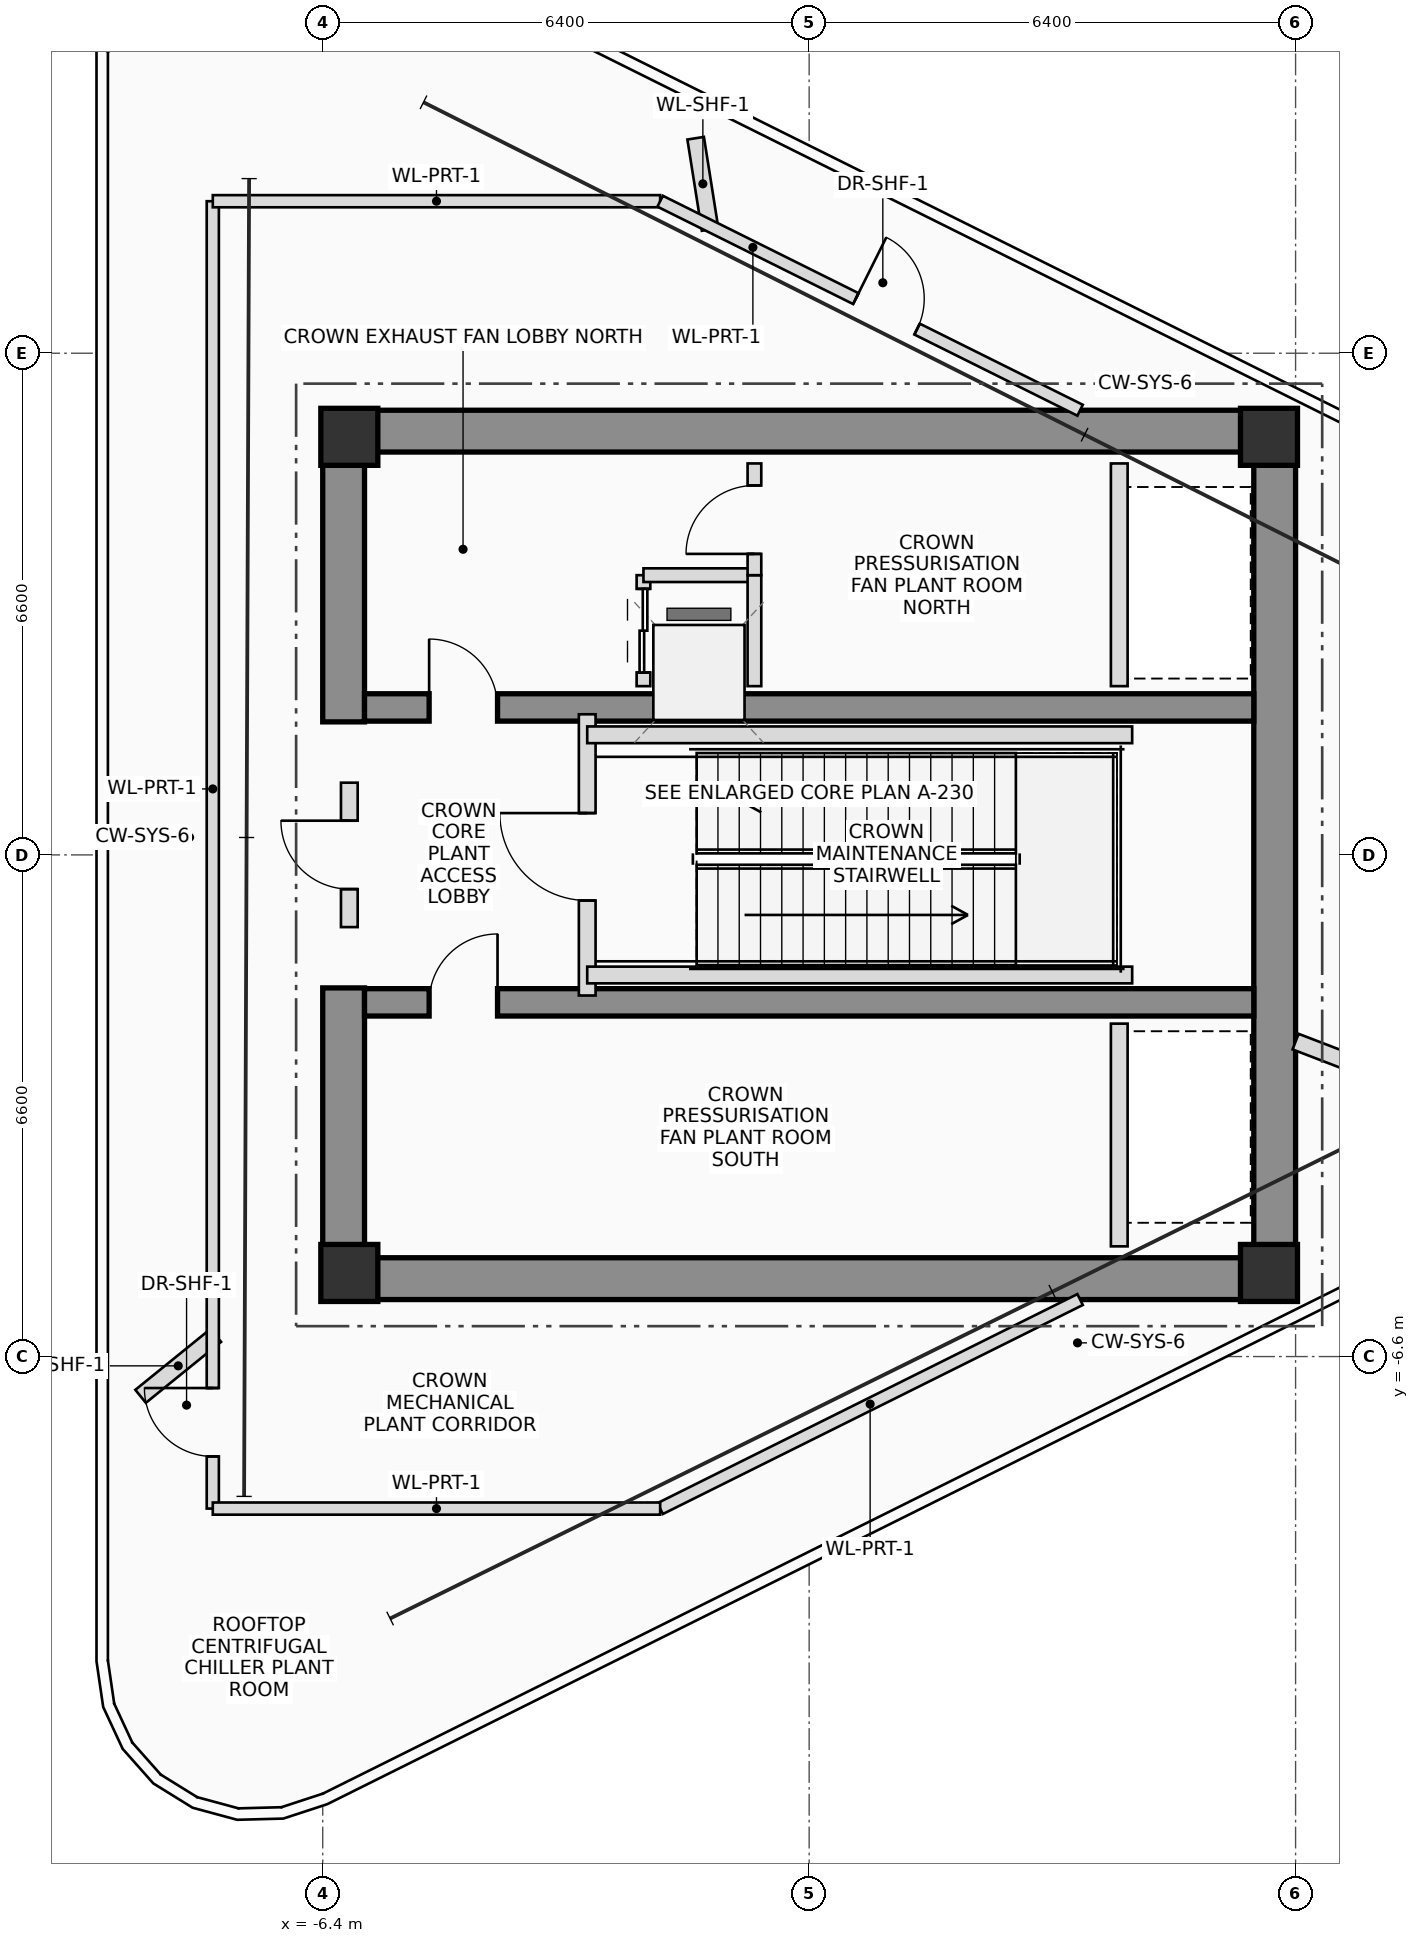
"""IFC4 building model, lengths in metres.
Left out: names, types, materials, properties, quantities, classifications, styles, units other than length and angle.
Written with IfcOpenShell. Run it as: python <this file> out.ifc"""

import sys

from ifc_helpers import new_model, si_unit, direction, frame, frame_2d, origin, origin_2d, place, context, subcontext, project, spatial, rectangle, extrude, source, transform, mapped, element, fill, save


model = new_model("IFC4")
c1 = context("Model", 3, precision=1e-05, world=origin(), true_north=direction((0.0, 1.0)))
c2 = subcontext(c1, "Body", "Model", "MODEL_VIEW")
j1 = project(units=[si_unit("LENGTHUNIT", "METRE"), si_unit("PLANEANGLEUNIT", "RADIAN")], contexts=[c1])
p1 = place(None, origin())
s1 = spatial("IfcSite", under=j1, at=p1, CompositionType="ELEMENT")
p2 = place(p1, origin())
s2 = spatial("IfcBuilding", under=s1, at=p2, CompositionType="ELEMENT")
p3 = place(p2, frame((0.0, 0.0, 328.25)))
s3 = spatial("IfcBuildingStorey", under=s2, at=p3, CompositionType="ELEMENT", Elevation=328.25)
m1 = source(origin(), c2, "Body", "SweptSolid", [
    extrude(rectangle(XDim=0.75, YDim=0.75, at=origin_2d()), origin(), (0.0, 0.0, 1.0), 5.2),
])
for number, where, z_axis, x_axis in (
    (1, (-6.05, -5.5, 0.0), (0.0, 0.0, 1.0), (1.0, 0.0, 0.0)),
    (2, (6.05, -5.5, 0.0), (0.0, 0.0, 1.0), (1.0, 0.0, 0.0)),
    (3, (6.05, 5.5, 0.0), (0.0, 0.0, 1.0), (1.0, 0.0, 0.0)),
    (4, (-6.05, 5.5, 0.0), (0.0, 0.0, 1.0), (1.0, 0.0, 0.0)),
):
    element("IfcColumn", number, at=place(p3, frame(where, z_axis=z_axis, x_axis=x_axis)), inside=s3, PredefinedType="COLUMN", context=c2, shape_type="MappedRepresentation", body=[
        mapped(m1, transform((0.0, 0.0, 0.0), scale=1.0)),
    ])
for number, where, z_axis, x_axis in (
    (5, (-6.4, 5.575, 0.0), (0.0, 0.0, 1.0), (1.0, 0.0, 0.0)),
    (6, (-6.4, -5.575, 0.0), (0.0, 0.0, 1.0), (1.0, 0.0, 0.0)),
):
    element("IfcWall", number, at=place(p3, frame(where, z_axis=z_axis, x_axis=x_axis)), inside=s3, PredefinedType="SHEAR", context=c2, shape_type="SweptSolid", body=[
        extrude(rectangle(XDim=12.8, YDim=0.55, at=frame_2d((6.4, 0.0))), origin(), (0.0, 0.0, 1.0), 5.2),
    ])
p4 = place(p3, frame((6.125, -5.3, 0.0), z_axis=(0.0, 0.0, 1.0), x_axis=(0.0, 1.0, 0.0)))
e7 = element("IfcWall", 7, at=p4, inside=s3, PredefinedType="SHEAR", context=c2, shape_type="SweptSolid", body=[
    extrude(rectangle(XDim=10.6, YDim=0.55, at=frame_2d((5.3, 0.0))), origin(), (0.0, 0.0, 1.0), 5.2),
])
for number, where, z_axis, x_axis in (
    (8, (-6.125, -5.3, 0.0), (0.0, 0.0, 1.0), (0.0, 1.0, 0.0)),
    (9, (-6.125, 1.75, 0.0), (0.0, 0.0, 1.0), (0.0, 1.0, 0.0)),
):
    element("IfcWall", number, at=place(p3, frame(where, z_axis=z_axis, x_axis=x_axis)), inside=s3, PredefinedType="SHEAR", context=c2, shape_type="SweptSolid", body=[
        extrude(rectangle(XDim=3.55, YDim=0.55, at=frame_2d((1.775, 0.0))), origin(), (0.0, 0.0, 1.0), 5.2),
    ])
p5 = place(p3, frame((-5.85, 1.94, 0.0), z_axis=(0.0, 0.0, 1.0), x_axis=(1.0, 0.0, 0.0)))
e10 = element("IfcWall", 10, at=p5, inside=s3, PredefinedType="SHEAR", context=c2, shape_type="SweptSolid", body=[
    extrude(rectangle(XDim=11.7, YDim=0.36, at=frame_2d((5.85, 0.0))), origin(), (0.0, 0.0, 1.0), 5.2),
])
p6 = place(p5, frame((0.85, 0.0, 0.0)))
e11 = element("IfcOpeningElement", 11, at=p6, cuts=e10, PredefinedType="OPENING", context=c2, shape_type="SweptSolid", body=[
    extrude(rectangle(XDim=0.9, YDim=2.05, at=frame_2d((0.45, 1.025))), frame((0.0, 0.19, 0.0), z_axis=(0.0, -1.0, 0.0), x_axis=(1.0, 0.0, 0.0)), (0.0, 0.0, 1.0), 0.38),
])
p7 = place(p3, frame((-5.85, -1.94, 0.0), z_axis=(0.0, 0.0, 1.0), x_axis=(1.0, 0.0, 0.0)))
e12 = element("IfcWall", 12, at=p7, inside=s3, PredefinedType="SHEAR", context=c2, shape_type="SweptSolid", body=[
    extrude(rectangle(XDim=11.7, YDim=0.36, at=frame_2d((5.85, 0.0))), origin(), (0.0, 0.0, 1.0), 5.2),
])
p8 = place(p7, frame((0.85, 0.0, 0.0)))
e13 = element("IfcOpeningElement", 13, at=p8, cuts=e12, PredefinedType="OPENING", context=c2, shape_type="SweptSolid", body=[
    extrude(rectangle(XDim=0.9, YDim=2.05, at=frame_2d((0.45, 1.025))), frame((0.0, 0.19, 0.0), z_axis=(0.0, -1.0, 0.0), x_axis=(1.0, 0.0, 0.0)), (0.0, 0.0, 1.0), 0.38),
])
p9 = place(p3, frame((-6.05, -0.95, 0.0), z_axis=(0.0, 0.0, 1.0), x_axis=(0.0, 1.0, 0.0)))
e14 = element("IfcWall", 14, at=p9, inside=s3, PredefinedType="PLUMBINGWALL", context=c2, shape_type="SweptSolid", body=[
    extrude(rectangle(XDim=1.9, YDim=0.22, at=frame_2d((0.95, 0.0))), origin(), (0.0, 0.0, 1.0), 3.9),
])
p10 = place(p9, frame((0.5, 0.0, 0.0)))
e15 = element("IfcOpeningElement", 15, at=p10, cuts=e14, PredefinedType="OPENING", context=c2, shape_type="SweptSolid", body=[
    extrude(rectangle(XDim=0.9, YDim=2.05, at=frame_2d((0.45, 1.025))), frame((0.0, 0.12, 0.0), z_axis=(0.0, -1.0, 0.0), x_axis=(1.0, 0.0, 0.0)), (0.0, 0.0, 1.0), 0.24),
])
p11 = place(p3, frame((-2.18, 2.22, 0.0), z_axis=(0.0, 0.0, 1.0), x_axis=(0.0, 1.0, 0.0)))
e16 = element("IfcWall", 16, at=p11, inside=s3, PredefinedType="PLUMBINGWALL", context=c2, shape_type="SweptSolid", body=[
    extrude(rectangle(XDim=1.46, YDim=0.18, at=frame_2d((0.73, 0.0))), origin(), (0.0, 0.0, 1.0), 4.92),
])
p12 = place(p11, frame((0.18, 0.0, 0.0)))
e17 = element("IfcOpeningElement", 17, at=p12, cuts=e16, PredefinedType="OPENING", context=c2, shape_type="SweptSolid", body=[
    extrude(rectangle(XDim=1.1, YDim=2.2, at=frame_2d((0.55, 1.1))), frame((0.0, 0.1, 0.0), z_axis=(0.0, -1.0, 0.0), x_axis=(1.0, 0.0, 0.0)), (0.0, 0.0, 1.0), 0.2),
])
for number, where, z_axis, x_axis in (
    (18, (-2.18, 3.68, 0.0), (0.0, 0.0, 1.0), (1.0, 0.0, 0.0)),
    (19, (-0.72, 2.22, 0.0), (0.0, 0.0, 1.0), (0.0, 1.0, 0.0)),
):
    element("IfcWall", number, at=place(p3, frame(where, z_axis=z_axis, x_axis=x_axis)), inside=s3, PredefinedType="PLUMBINGWALL", context=c2, shape_type="SweptSolid", body=[
        extrude(rectangle(XDim=1.46, YDim=0.18, at=frame_2d((0.73, 0.0))), origin(), (0.0, 0.0, 1.0), 4.92),
    ])
p13 = place(p3, frame((-2.92, -1.85, 0.0), z_axis=(0.0, 0.0, 1.0), x_axis=(0.0, 1.0, 0.0)))
e20 = element("IfcWall", 20, at=p13, inside=s3, PredefinedType="PLUMBINGWALL", context=c2, shape_type="SweptSolid", body=[
    extrude(rectangle(XDim=3.7, YDim=0.22, at=frame_2d((1.85, 0.0))), origin(), (0.0, 0.0, 1.0), 4.92),
])
p14 = place(p13, frame((1.25, 0.0, 0.0)))
e21 = element("IfcOpeningElement", 21, at=p14, cuts=e20, PredefinedType="OPENING", context=c2, shape_type="SweptSolid", body=[
    extrude(rectangle(XDim=1.15, YDim=2.15, at=frame_2d((0.575, 1.075))), frame((0.0, 0.12, 0.0), z_axis=(0.0, -1.0, 0.0), x_axis=(1.0, 0.0, 0.0)), (0.0, 0.0, 1.0), 0.24),
])
for number, where, z_axis, x_axis in (
    (22, (-2.92, 1.58, 0.0), (0.0, 0.0, 1.0), (1.0, 0.0, 0.0)),
    (23, (-2.92, -1.58, 0.0), (0.0, 0.0, 1.0), (1.0, 0.0, 0.0)),
):
    element("IfcWall", number, at=place(p3, frame(where, z_axis=z_axis, x_axis=x_axis)), inside=s3, PredefinedType="PLUMBINGWALL", context=c2, shape_type="SweptSolid", body=[
        extrude(rectangle(XDim=7.17, YDim=0.22, at=frame_2d((3.585, 0.0))), origin(), (0.0, 0.0, 1.0), 4.92),
    ])
for number, where, z_axis, x_axis in (
    (24, (4.08, 2.22, 0.0), (0.0, 0.0, 1.0), (0.0, 1.0, 0.0)),
    (25, (4.08, -5.15, 0.0), (0.0, 0.0, 1.0), (0.0, 1.0, 0.0)),
):
    element("IfcWall", number, at=place(p3, frame(where, z_axis=z_axis, x_axis=x_axis)), inside=s3, PredefinedType="PLUMBINGWALL", context=c2, shape_type="SweptSolid", body=[
        extrude(rectangle(XDim=2.93, YDim=0.22, at=frame_2d((1.465, 0.0))), origin(), (0.0, 0.0, 1.0), 4.92),
    ])
p15 = place(p3, frame((-0.72, 3.68, 0.0), z_axis=(0.0, 0.0, 1.0), x_axis=(0.0, 1.0, 0.0)))
e26 = element("IfcWall", 26, at=p15, inside=s3, PredefinedType="PLUMBINGWALL", context=c2, shape_type="SweptSolid", body=[
    extrude(rectangle(XDim=1.47, YDim=0.18, at=frame_2d((0.735, 0.0))), origin(), (0.0, 0.0, 1.0), 4.92),
])
p16 = place(p15, frame((0.28, 0.0, 0.0)))
e27 = element("IfcOpeningElement", 27, at=p16, cuts=e26, PredefinedType="OPENING", context=c2, shape_type="SweptSolid", body=[
    extrude(rectangle(XDim=0.9, YDim=2.05, at=frame_2d((0.45, 1.025))), frame((0.0, 0.1, 0.0), z_axis=(0.0, -1.0, 0.0), x_axis=(1.0, 0.0, 0.0)), (0.0, 0.0, 1.0), 0.2),
])
p17 = place(p3, frame((-1.303, 8.228, 0.0), z_axis=(0.0, 0.0, 1.0), x_axis=(-0.156478301394, 0.987681396602, 0.0)))
e28 = element("IfcWall", 28, at=p17, inside=s3, PredefinedType="PLUMBINGWALL", context=c2, shape_type="SweptSolid", body=[
    extrude(rectangle(XDim=1.215, YDim=0.22, at=frame_2d((0.608, 0.0))), origin(), (0.0, 0.0, 1.0), 4.92),
])
p18 = place(p3, frame((-7.806, -6.321, 0.0), z_axis=(0.0, 0.0, 1.0), x_axis=(-0.777115429098, -0.629358093504, 0.0)))
e29 = element("IfcWall", 29, at=p18, inside=s3, PredefinedType="PLUMBINGWALL", context=c2, shape_type="SweptSolid", body=[
    extrude(rectangle(XDim=1.274, YDim=0.22, at=frame_2d((0.637, 0.0))), origin(), (0.0, 0.0, 1.0), 4.92),
])
p19 = place(p3, frame((6.4, -2.457, 0.0), z_axis=(0.0, 0.0, 1.0), x_axis=(0.933585314896, -0.358355214571, 0.0)))
e30 = element("IfcWall", 30, at=p19, inside=s3, PredefinedType="PLUMBINGWALL", context=c2, shape_type="SweptSolid", body=[
    extrude(rectangle(XDim=3.698, YDim=0.22, at=frame_2d((1.849, 0.0))), origin(), (0.0, 0.0, 1.0), 4.92),
])
p20 = place(p3, frame((-7.846, -8.6, 0.0), z_axis=(0.0, 0.0, 1.0), x_axis=(0.0, 1.0, 0.0)))
e31 = element("IfcWall", 31, at=p20, inside=s3, PredefinedType="PARTITIONING", context=c2, shape_type="SweptSolid", body=[
    extrude(rectangle(XDim=17.2, YDim=0.16, at=frame_2d((8.6, 0.0))), origin(), (0.0, 0.0, 1.0), 4.92),
])
p21 = place(p20, frame((0.686, 0.0, 0.0)))
e32 = element("IfcOpeningElement", 32, at=p21, cuts=e31, PredefinedType="OPENING", context=c2, shape_type="SweptSolid", body=[
    extrude(rectangle(XDim=0.9, YDim=2.05, at=frame_2d((0.45, 1.025))), frame((0.0, 0.09, 0.0), z_axis=(0.0, -1.0, 0.0), x_axis=(1.0, 0.0, 0.0)), (0.0, 0.0, 1.0), 0.18),
])
p22 = place(p3, frame((-7.846, 8.6, 0.0), z_axis=(0.0, 0.0, 1.0), x_axis=(1.0, 0.0, 0.0)))
e33 = element("IfcWall", 33, at=p22, inside=s3, PredefinedType="PARTITIONING", context=c2, shape_type="SweptSolid", body=[
    extrude(rectangle(XDim=5.886, YDim=0.16, at=frame_2d((2.943, 0.0))), origin(), (0.0, 0.0, 1.0), 4.92),
])
p23 = place(p3, frame((-1.96, 8.6, 0.0), z_axis=(0.0, 0.0, 1.0), x_axis=(0.895248457737, -0.445567277658, 0.0)))
e34 = element("IfcWall", 34, at=p23, inside=s3, PredefinedType="PARTITIONING", context=c2, shape_type="SweptSolid", body=[
    extrude(rectangle(XDim=6.172, YDim=0.16, at=frame_2d((3.086, 0.0))), origin(), (0.0, 0.0, 1.0), 4.92),
])
p24 = place(p23, frame((2.876, 0.0, 0.0)))
e35 = element("IfcOpeningElement", 35, at=p24, cuts=e34, PredefinedType="OPENING", context=c2, shape_type="SweptSolid", body=[
    extrude(rectangle(XDim=0.9, YDim=2.05, at=frame_2d((0.45, 1.025))), frame((0.0, 0.09, 0.0), z_axis=(0.0, -1.0, 0.0), x_axis=(1.0, 0.0, 0.0)), (0.0, 0.0, 1.0), 0.18),
])
p25 = place(p3, frame((3.565, -5.85, 0.0), z_axis=(0.0, 0.0, 1.0), x_axis=(-0.895248457737, -0.445567277658, 0.0)))
e36 = element("IfcWall", 36, at=p25, inside=s3, PredefinedType="PARTITIONING", context=c2, shape_type="SweptSolid", body=[
    extrude(rectangle(XDim=6.172, YDim=0.16, at=frame_2d((3.086, 0.0))), origin(), (0.0, 0.0, 1.0), 4.92),
])
p26 = place(p3, frame((-1.96, -8.6, 0.0), z_axis=(0.0, 0.0, 1.0), x_axis=(-1.0, 0.0, 0.0)))
e37 = element("IfcWall", 37, at=p26, inside=s3, PredefinedType="PARTITIONING", context=c2, shape_type="SweptSolid", body=[
    extrude(rectangle(XDim=5.886, YDim=0.16, at=frame_2d((2.943, 0.0))), origin(), (0.0, 0.0, 1.0), 4.92),
])
p27 = place(p10, origin())
e38 = element("IfcDoor", 38, at=p27, inside=s3, OperationType="SINGLE_SWING_RIGHT", PredefinedType="DOOR", context=c2, shape_type="SweptSolid", body=[
    extrude(rectangle(XDim=0.9, YDim=2.05, at=frame_2d((0.45, 1.025))), frame((0.0, 0.025, 0.0), z_axis=(0.0, -1.0, 0.0), x_axis=(1.0, 0.0, 0.0)), (0.0, 0.0, 1.0), 0.05),
])
fill(e15, e38)
p28 = place(p6, origin())
e39 = element("IfcDoor", 39, at=p28, inside=s3, OperationType="SINGLE_SWING_LEFT", PredefinedType="DOOR", context=c2, shape_type="SweptSolid", body=[
    extrude(rectangle(XDim=0.9, YDim=2.05, at=frame_2d((0.45, 1.025))), frame((0.0, 0.025, 0.0), z_axis=(0.0, -1.0, 0.0), x_axis=(1.0, 0.0, 0.0)), (0.0, 0.0, 1.0), 0.05),
])
fill(e11, e39)
p29 = place(p8, origin())
e40 = element("IfcDoor", 40, at=p29, inside=s3, OperationType="SINGLE_SWING_RIGHT", PredefinedType="DOOR", context=c2, shape_type="SweptSolid", body=[
    extrude(rectangle(XDim=0.9, YDim=2.05, at=frame_2d((0.45, 1.025))), frame((0.0, 0.025, 0.0), z_axis=(0.0, -1.0, 0.0), x_axis=(1.0, 0.0, 0.0)), (0.0, 0.0, 1.0), 0.05),
])
fill(e13, e40)
p30 = place(p12, origin())
e41 = element("IfcDoor", 41, at=p30, inside=s3, OperationType="DOUBLE_DOOR_SLIDING", PredefinedType="DOOR", context=c2, shape_type="SweptSolid", body=[
    extrude(rectangle(XDim=1.1, YDim=2.2, at=frame_2d((0.55, 1.1))), frame((0.0, 0.025, 0.0), z_axis=(0.0, -1.0, 0.0), x_axis=(1.0, 0.0, 0.0)), (0.0, 0.0, 1.0), 0.05),
])
fill(e17, e41)
p31 = place(p14, origin())
e42 = element("IfcDoor", 42, at=p31, inside=s3, OperationType="SINGLE_SWING_RIGHT", PredefinedType="DOOR", context=c2, shape_type="SweptSolid", body=[
    extrude(rectangle(XDim=1.15, YDim=2.15, at=frame_2d((0.575, 1.075))), frame((0.0, 0.025, 0.0), z_axis=(0.0, -1.0, 0.0), x_axis=(1.0, 0.0, 0.0)), (0.0, 0.0, 1.0), 0.05),
])
fill(e21, e42)
p32 = place(p16, origin())
e43 = element("IfcDoor", 43, at=p32, inside=s3, OperationType="SINGLE_SWING_LEFT", PredefinedType="DOOR", context=c2, shape_type="SweptSolid", body=[
    extrude(rectangle(XDim=0.9, YDim=2.05, at=frame_2d((0.45, 1.025))), frame((0.0, 0.025, 0.0), z_axis=(0.0, -1.0, 0.0), x_axis=(1.0, 0.0, 0.0)), (0.0, 0.0, 1.0), 0.05),
])
fill(e27, e43)
p33 = place(p21, origin())
e44 = element("IfcDoor", 44, at=p33, inside=s3, OperationType="SINGLE_SWING_RIGHT", PredefinedType="DOOR", context=c2, shape_type="SweptSolid", body=[
    extrude(rectangle(XDim=0.9, YDim=2.05, at=frame_2d((0.45, 1.025))), frame((0.0, 0.025, 0.0), z_axis=(0.0, -1.0, 0.0), x_axis=(1.0, 0.0, 0.0)), (0.0, 0.0, 1.0), 0.05),
])
fill(e32, e44)
p34 = place(p24, origin())
e45 = element("IfcDoor", 45, at=p34, inside=s3, OperationType="SINGLE_SWING_LEFT", PredefinedType="DOOR", context=c2, shape_type="SweptSolid", body=[
    extrude(rectangle(XDim=0.9, YDim=2.05, at=frame_2d((0.45, 1.025))), frame((0.0, 0.025, 0.0), z_axis=(0.0, -1.0, 0.0), x_axis=(1.0, 0.0, 0.0)), (0.0, 0.0, 1.0), 0.05),
])
fill(e35, e45)
save(model, sys.argv[1])
